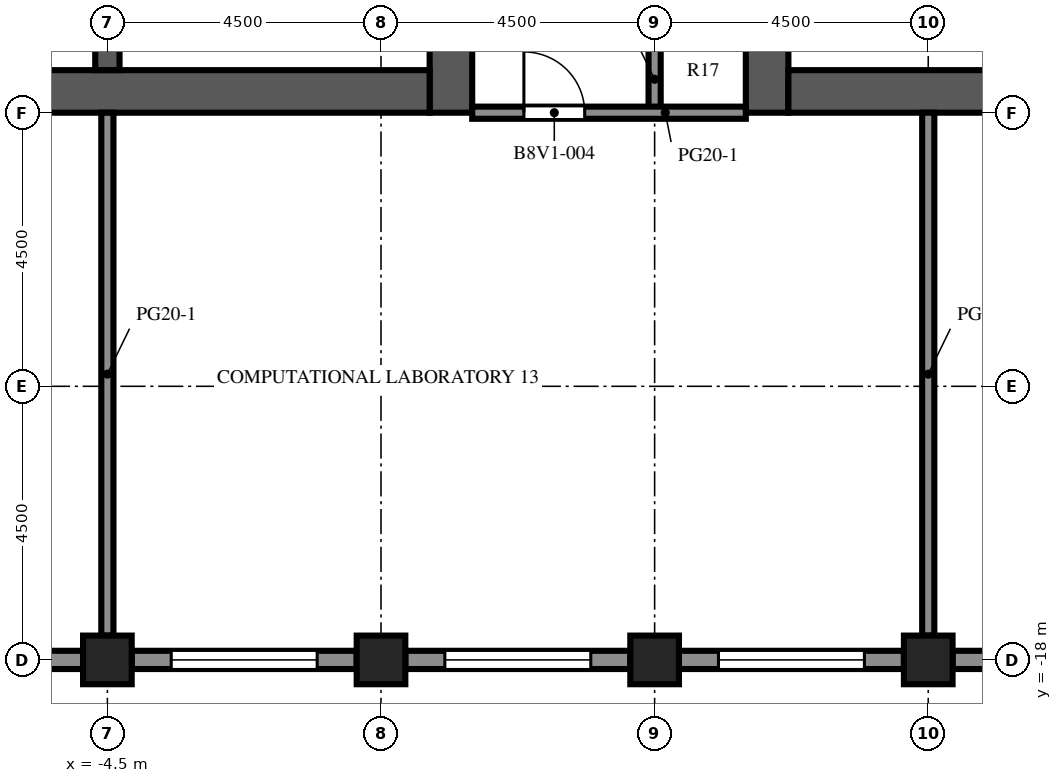
"""IFC4 building model, lengths in metres.
Left out: names, types, materials, properties, quantities, classifications, styles, units other than length and angle.
Written with IfcOpenShell. Run it as: python <this file> out.ifc"""

import sys

from ifc_helpers import new_model, si_unit, direction, frame, frame_2d, origin, origin_2d, place, context, subcontext, project, spatial, rectangle, extrude, element, fill, save


model = new_model("IFC4")
c1 = context("Model", 3, precision=1e-05, world=origin(), true_north=direction((0.0, 1.0)))
c2 = subcontext(c1, "Body", "Model", "MODEL_VIEW")
j1 = project(units=[si_unit("LENGTHUNIT", "METRE"), si_unit("PLANEANGLEUNIT", "RADIAN")], contexts=[c1])
p1 = place(None, origin())
s1 = spatial("IfcSite", under=j1, at=p1, CompositionType="ELEMENT")
p2 = place(p1, origin())
s2 = spatial("IfcBuilding", under=s1, at=p2, CompositionType="ELEMENT")
p3 = place(p2, frame((0.0, 0.0, 278.6)))
s3 = spatial("IfcBuildingStorey", under=s2, at=p3, CompositionType="ELEMENT", Elevation=278.6)
for number, where, z_axis, x_axis in (
    (1, (-4.5, -18.0, 0.0), (0.0, 0.0, 1.0), (1.0, 0.0, 0.0)),
    (2, (0.0, -18.0, 0.0), (0.0, 0.0, 1.0), (1.0, 0.0, 0.0)),
    (3, (4.5, -18.0, 0.0), (0.0, 0.0, 1.0), (1.0, 0.0, 0.0)),
    (4, (9.0, -18.0, 0.0), (0.0, 0.0, 1.0), (1.0, 0.0, 0.0)),
):
    element("IfcColumn", number, at=place(p3, frame(where, z_axis=z_axis, x_axis=x_axis)), inside=s3, PredefinedType="COLUMN", context=c2, shape_type="SweptSolid", body=[
        extrude(rectangle(XDim=0.8, YDim=0.8, at=origin_2d()), origin(), (0.0, 0.0, 1.0), 4.1),
    ])
p4 = place(p3, frame((1.15, -9.0, 0.0), z_axis=(0.0, 0.0, 1.0), x_axis=(0.0, 1.0, 0.0)))
e5 = element("IfcWall", 5, at=p4, inside=s3, PredefinedType="SHEAR", context=c2, shape_type="SweptSolid", body=[
    extrude(rectangle(XDim=27.5, YDim=0.7, at=frame_2d((13.75, 0.0))), origin(), (0.0, 0.0, 1.0), 4.1),
])
p5 = place(p4, frame((12.55, 0.0, 0.0)))
e6 = element("IfcOpeningElement", 6, at=p5, cuts=e5, PredefinedType="OPENING", context=c2, shape_type="SweptSolid", body=[
    extrude(rectangle(XDim=2.4, YDim=2.4, at=frame_2d((1.2, 1.2))), frame((0.0, 0.36, 0.0), z_axis=(0.0, -1.0, 0.0), x_axis=(1.0, 0.0, 0.0)), (0.0, 0.0, 1.0), 0.72),
])
p6 = place(p4, frame((3.9, 0.0, 0.0)))
e7 = element("IfcOpeningElement", 7, at=p6, cuts=e5, PredefinedType="OPENING", context=c2, shape_type="SweptSolid", body=[
    extrude(rectangle(XDim=1.2, YDim=2.1, at=frame_2d((0.6, 1.05))), frame((0.0, 0.36, 0.0), z_axis=(0.0, -1.0, 0.0), x_axis=(1.0, 0.0, 0.0)), (0.0, 0.0, 1.0), 0.72),
])
p7 = place(p4, frame((19.46, 0.0, 0.0)))
e8 = element("IfcOpeningElement", 8, at=p7, cuts=e5, PredefinedType="OPENING", context=c2, shape_type="SweptSolid", body=[
    extrude(rectangle(XDim=1.0, YDim=2.1, at=frame_2d((0.5, 1.05))), frame((0.0, 0.36, 0.0), z_axis=(0.0, -1.0, 0.0), x_axis=(1.0, 0.0, 0.0)), (0.0, 0.0, 1.0), 0.72),
])
p8 = place(p4, frame((21.17, 0.0, 0.0)))
e9 = element("IfcOpeningElement", 9, at=p8, cuts=e5, PredefinedType="OPENING", context=c2, shape_type="SweptSolid", body=[
    extrude(rectangle(XDim=1.0, YDim=2.1, at=frame_2d((0.5, 1.05))), frame((0.0, 0.36, 0.0), z_axis=(0.0, -1.0, 0.0), x_axis=(1.0, 0.0, 0.0)), (0.0, 0.0, 1.0), 0.72),
])
p9 = place(p4, frame((23.26, 0.0, 0.0)))
e10 = element("IfcOpeningElement", 10, at=p9, cuts=e5, PredefinedType="OPENING", context=c2, shape_type="SweptSolid", body=[
    extrude(rectangle(XDim=1.0, YDim=2.1, at=frame_2d((0.5, 1.05))), frame((0.0, 0.36, 0.0), z_axis=(0.0, -1.0, 0.0), x_axis=(1.0, 0.0, 0.0)), (0.0, 0.0, 1.0), 0.72),
])
p10 = place(p4, frame((25.35, 0.0, 0.0)))
e11 = element("IfcOpeningElement", 11, at=p10, cuts=e5, PredefinedType="OPENING", context=c2, shape_type="SweptSolid", body=[
    extrude(rectangle(XDim=1.0, YDim=2.1, at=frame_2d((0.5, 1.05))), frame((0.0, 0.36, 0.0), z_axis=(0.0, -1.0, 0.0), x_axis=(1.0, 0.0, 0.0)), (0.0, 0.0, 1.0), 0.72),
])
p11 = place(p3, frame((-9.8, -8.65, 0.0), z_axis=(0.0, 0.0, 1.0), x_axis=(1.0, 0.0, 0.0)))
e12 = element("IfcWall", 12, at=p11, inside=s3, PredefinedType="SHEAR", context=c2, shape_type="SweptSolid", body=[
    extrude(rectangle(XDim=10.6, YDim=0.7, at=frame_2d((5.3, 0.0))), origin(), (0.0, 0.0, 1.0), 4.1),
])
p12 = place(p3, frame((-4.5, -8.3, 0.0), z_axis=(0.0, 0.0, 1.0), x_axis=(0.0, 1.0, 0.0)))
e13 = element("IfcWall", 13, at=p12, inside=s3, PredefinedType="SHEAR", context=c2, shape_type="SweptSolid", body=[
    extrude(rectangle(XDim=7.6, YDim=0.4, at=frame_2d((3.8, 0.0))), origin(), (0.0, 0.0, 1.0), 4.1),
])
p13 = place(p3, frame((6.35, -9.0, 0.0), z_axis=(0.0, 0.0, 1.0), x_axis=(0.0, 1.0, 0.0)))
e14 = element("IfcWall", 14, at=p13, inside=s3, PredefinedType="SHEAR", context=c2, shape_type="SweptSolid", body=[
    extrude(rectangle(XDim=27.5, YDim=0.7, at=frame_2d((13.75, 0.0))), origin(), (0.0, 0.0, 1.0), 4.1),
])
p14 = place(p13, frame((12.55, 0.0, 0.0)))
e15 = element("IfcOpeningElement", 15, at=p14, cuts=e14, PredefinedType="OPENING", context=c2, shape_type="SweptSolid", body=[
    extrude(rectangle(XDim=2.4, YDim=2.4, at=frame_2d((1.2, 1.2))), frame((0.0, 0.36, 0.0), z_axis=(0.0, -1.0, 0.0), x_axis=(1.0, 0.0, 0.0)), (0.0, 0.0, 1.0), 0.72),
])
p15 = place(p13, frame((3.9, 0.0, 0.0)))
e16 = element("IfcOpeningElement", 16, at=p15, cuts=e14, PredefinedType="OPENING", context=c2, shape_type="SweptSolid", body=[
    extrude(rectangle(XDim=1.2, YDim=2.1, at=frame_2d((0.6, 1.05))), frame((0.0, 0.36, 0.0), z_axis=(0.0, -1.0, 0.0), x_axis=(1.0, 0.0, 0.0)), (0.0, 0.0, 1.0), 0.72),
])
p16 = place(p13, frame((19.46, 0.0, 0.0)))
e17 = element("IfcOpeningElement", 17, at=p16, cuts=e14, PredefinedType="OPENING", context=c2, shape_type="SweptSolid", body=[
    extrude(rectangle(XDim=1.0, YDim=2.1, at=frame_2d((0.5, 1.05))), frame((0.0, 0.36, 0.0), z_axis=(0.0, -1.0, 0.0), x_axis=(1.0, 0.0, 0.0)), (0.0, 0.0, 1.0), 0.72),
])
p17 = place(p13, frame((21.17, 0.0, 0.0)))
e18 = element("IfcOpeningElement", 18, at=p17, cuts=e14, PredefinedType="OPENING", context=c2, shape_type="SweptSolid", body=[
    extrude(rectangle(XDim=1.0, YDim=2.1, at=frame_2d((0.5, 1.05))), frame((0.0, 0.36, 0.0), z_axis=(0.0, -1.0, 0.0), x_axis=(1.0, 0.0, 0.0)), (0.0, 0.0, 1.0), 0.72),
])
p18 = place(p13, frame((23.26, 0.0, 0.0)))
e19 = element("IfcOpeningElement", 19, at=p18, cuts=e14, PredefinedType="OPENING", context=c2, shape_type="SweptSolid", body=[
    extrude(rectangle(XDim=1.0, YDim=2.1, at=frame_2d((0.5, 1.05))), frame((0.0, 0.36, 0.0), z_axis=(0.0, -1.0, 0.0), x_axis=(1.0, 0.0, 0.0)), (0.0, 0.0, 1.0), 0.72),
])
p19 = place(p13, frame((25.35, 0.0, 0.0)))
e20 = element("IfcOpeningElement", 20, at=p19, cuts=e14, PredefinedType="OPENING", context=c2, shape_type="SweptSolid", body=[
    extrude(rectangle(XDim=1.0, YDim=2.1, at=frame_2d((0.5, 1.05))), frame((0.0, 0.36, 0.0), z_axis=(0.0, -1.0, 0.0), x_axis=(1.0, 0.0, 0.0)), (0.0, 0.0, 1.0), 0.72),
])
p20 = place(p3, frame((6.7, -8.65, 0.0), z_axis=(0.0, 0.0, 1.0), x_axis=(1.0, 0.0, 0.0)))
e21 = element("IfcWall", 21, at=p20, inside=s3, PredefinedType="SHEAR", context=c2, shape_type="SweptSolid", body=[
    extrude(rectangle(XDim=10.6, YDim=0.7, at=frame_2d((5.3, 0.0))), origin(), (0.0, 0.0, 1.0), 4.1),
])
p21 = place(p3, frame((-4.9, -18.0, 0.0), z_axis=(0.0, 0.0, 1.0), x_axis=(-1.0, 0.0, 0.0)))
e22 = element("IfcWall", 22, at=p21, inside=s3, PredefinedType="SOLIDWALL", context=c2, shape_type="SweptSolid", body=[
    extrude(rectangle(XDim=3.7, YDim=0.3, at=frame_2d((1.85, 0.0))), origin(), (0.0, 0.0, 1.0), 2.85),
])
p22 = place(p21, frame((0.65, 0.0, 0.8)))
e23 = element("IfcOpeningElement", 23, at=p22, cuts=e22, PredefinedType="OPENING", context=c2, shape_type="SweptSolid", body=[
    extrude(rectangle(XDim=2.4, YDim=1.7, at=frame_2d((1.2, 0.85))), frame((0.0, 0.16, 0.0), z_axis=(0.0, -1.0, 0.0), x_axis=(1.0, 0.0, 0.0)), (0.0, 0.0, 1.0), 0.32),
])
p23 = place(p3, frame((-0.4, -18.0, 0.0), z_axis=(0.0, 0.0, 1.0), x_axis=(-1.0, 0.0, 0.0)))
e24 = element("IfcWall", 24, at=p23, inside=s3, PredefinedType="SOLIDWALL", context=c2, shape_type="SweptSolid", body=[
    extrude(rectangle(XDim=3.7, YDim=0.3, at=frame_2d((1.85, 0.0))), origin(), (0.0, 0.0, 1.0), 2.85),
])
p24 = place(p23, frame((0.65, 0.0, 0.8)))
e25 = element("IfcOpeningElement", 25, at=p24, cuts=e24, PredefinedType="OPENING", context=c2, shape_type="SweptSolid", body=[
    extrude(rectangle(XDim=2.4, YDim=1.7, at=frame_2d((1.2, 0.85))), frame((0.0, 0.16, 0.0), z_axis=(0.0, -1.0, 0.0), x_axis=(1.0, 0.0, 0.0)), (0.0, 0.0, 1.0), 0.32),
])
p25 = place(p3, frame((4.1, -18.0, 0.0), z_axis=(0.0, 0.0, 1.0), x_axis=(-1.0, 0.0, 0.0)))
e26 = element("IfcWall", 26, at=p25, inside=s3, PredefinedType="SOLIDWALL", context=c2, shape_type="SweptSolid", body=[
    extrude(rectangle(XDim=3.7, YDim=0.3, at=frame_2d((1.85, 0.0))), origin(), (0.0, 0.0, 1.0), 2.85),
])
p26 = place(p25, frame((0.65, 0.0, 0.8)))
e27 = element("IfcOpeningElement", 27, at=p26, cuts=e26, PredefinedType="OPENING", context=c2, shape_type="SweptSolid", body=[
    extrude(rectangle(XDim=2.4, YDim=1.7, at=frame_2d((1.2, 0.85))), frame((0.0, 0.16, 0.0), z_axis=(0.0, -1.0, 0.0), x_axis=(1.0, 0.0, 0.0)), (0.0, 0.0, 1.0), 0.32),
])
p27 = place(p3, frame((8.6, -18.0, 0.0), z_axis=(0.0, 0.0, 1.0), x_axis=(-1.0, 0.0, 0.0)))
e28 = element("IfcWall", 28, at=p27, inside=s3, PredefinedType="SOLIDWALL", context=c2, shape_type="SweptSolid", body=[
    extrude(rectangle(XDim=3.7, YDim=0.3, at=frame_2d((1.85, 0.0))), origin(), (0.0, 0.0, 1.0), 2.85),
])
p28 = place(p27, frame((0.65, 0.0, 0.8)))
e29 = element("IfcOpeningElement", 29, at=p28, cuts=e28, PredefinedType="OPENING", context=c2, shape_type="SweptSolid", body=[
    extrude(rectangle(XDim=2.4, YDim=1.7, at=frame_2d((1.2, 0.85))), frame((0.0, 0.16, 0.0), z_axis=(0.0, -1.0, 0.0), x_axis=(1.0, 0.0, 0.0)), (0.0, 0.0, 1.0), 0.32),
])
p29 = place(p3, frame((13.1, -18.0, 0.0), z_axis=(0.0, 0.0, 1.0), x_axis=(-1.0, 0.0, 0.0)))
e30 = element("IfcWall", 30, at=p29, inside=s3, PredefinedType="SOLIDWALL", context=c2, shape_type="SweptSolid", body=[
    extrude(rectangle(XDim=3.7, YDim=0.3, at=frame_2d((1.85, 0.0))), origin(), (0.0, 0.0, 1.0), 2.85),
])
p30 = place(p29, frame((1.35, 0.0, 0.0)))
e31 = element("IfcOpeningElement", 31, at=p30, cuts=e30, PredefinedType="OPENING", context=c2, shape_type="SweptSolid", body=[
    extrude(rectangle(XDim=1.0, YDim=2.2, at=frame_2d((0.5, 1.1))), frame((0.0, 0.16, 0.0), z_axis=(0.0, -1.0, 0.0), x_axis=(1.0, 0.0, 0.0)), (0.0, 0.0, 1.0), 0.32),
])
p31 = place(p3, frame((-4.5, -17.6, 0.0), z_axis=(0.0, 0.0, 1.0), x_axis=(0.0, 1.0, 0.0)))
e32 = element("IfcWall", 32, at=p31, inside=s3, PredefinedType="PARTITIONING", context=c2, shape_type="SweptSolid", body=[
    extrude(rectangle(XDim=8.6, YDim=0.2, at=frame_2d((4.3, 0.0))), origin(), (0.0, 0.0, 1.0), 3.65),
])
p32 = place(p3, frame((4.5, -6.0, 0.0), z_axis=(0.0, 0.0, 1.0), x_axis=(0.0, -1.0, 0.0)))
e33 = element("IfcWall", 33, at=p32, inside=s3, PredefinedType="PARTITIONING", context=c2, shape_type="SweptSolid", body=[
    extrude(rectangle(XDim=3.0, YDim=0.2, at=frame_2d((1.5, 0.0))), origin(), (0.0, 0.0, 1.0), 3.65),
])
p33 = place(p32, frame((0.9, 0.0, 0.0)))
e34 = element("IfcOpeningElement", 34, at=p33, cuts=e33, PredefinedType="OPENING", context=c2, shape_type="SweptSolid", body=[
    extrude(rectangle(XDim=1.0, YDim=2.1, at=frame_2d((0.5, 1.05))), frame((0.0, 0.11, 0.0), z_axis=(0.0, -1.0, 0.0), x_axis=(1.0, 0.0, 0.0)), (0.0, 0.0, 1.0), 0.22),
])
p34 = place(p3, frame((9.0, -17.6, 0.0), z_axis=(0.0, 0.0, 1.0), x_axis=(0.0, 1.0, 0.0)))
e35 = element("IfcWall", 35, at=p34, inside=s3, PredefinedType="PARTITIONING", context=c2, shape_type="SweptSolid", body=[
    extrude(rectangle(XDim=8.6, YDim=0.2, at=frame_2d((4.3, 0.0))), origin(), (0.0, 0.0, 1.0), 3.65),
])
p35 = place(p3, frame((6.0, -9.0, 0.0), z_axis=(0.0, 0.0, 1.0), x_axis=(-1.0, 0.0, 0.0)))
e36 = element("IfcWall", 36, at=p35, inside=s3, PredefinedType="PARTITIONING", context=c2, shape_type="SweptSolid", body=[
    extrude(rectangle(XDim=4.5, YDim=0.2, at=frame_2d((2.25, 0.0))), origin(), (0.0, 0.0, 1.0), 3.65),
])
p36 = place(p35, frame((2.65, 0.0, 0.0)))
e37 = element("IfcOpeningElement", 37, at=p36, cuts=e36, PredefinedType="OPENING", context=c2, shape_type="SweptSolid", body=[
    extrude(rectangle(XDim=1.0, YDim=2.1, at=frame_2d((0.5, 1.05))), frame((0.0, 0.11, 0.0), z_axis=(0.0, -1.0, 0.0), x_axis=(1.0, 0.0, 0.0)), (0.0, 0.0, 1.0), 0.22),
])
p37 = place(p24, origin())
e38 = element("IfcWindow", 38, at=p37, inside=s3, PartitioningType="SINGLE_PANEL", PredefinedType="WINDOW", context=c2, shape_type="SweptSolid", body=[
    extrude(rectangle(XDim=2.4, YDim=1.7, at=frame_2d((1.2, 0.85))), frame((0.0, 0.03, 0.0), z_axis=(0.0, -1.0, 0.0), x_axis=(1.0, 0.0, 0.0)), (0.0, 0.0, 1.0), 0.06),
])
fill(e25, e38)
p38 = place(p26, origin())
e39 = element("IfcWindow", 39, at=p38, inside=s3, PartitioningType="SINGLE_PANEL", PredefinedType="WINDOW", context=c2, shape_type="SweptSolid", body=[
    extrude(rectangle(XDim=2.4, YDim=1.7, at=frame_2d((1.2, 0.85))), frame((0.0, 0.03, 0.0), z_axis=(0.0, -1.0, 0.0), x_axis=(1.0, 0.0, 0.0)), (0.0, 0.0, 1.0), 0.06),
])
fill(e27, e39)
p39 = place(p28, origin())
e40 = element("IfcWindow", 40, at=p39, inside=s3, PartitioningType="SINGLE_PANEL", PredefinedType="WINDOW", context=c2, shape_type="SweptSolid", body=[
    extrude(rectangle(XDim=2.4, YDim=1.7, at=frame_2d((1.2, 0.85))), frame((0.0, 0.03, 0.0), z_axis=(0.0, -1.0, 0.0), x_axis=(1.0, 0.0, 0.0)), (0.0, 0.0, 1.0), 0.06),
])
fill(e29, e40)
p40 = place(p36, origin())
e41 = element("IfcDoor", 41, at=p40, inside=s3, OperationType="SINGLE_SWING_RIGHT", PredefinedType="DOOR", context=c2, shape_type="SweptSolid", body=[
    extrude(rectangle(XDim=1.0, YDim=2.1, at=frame_2d((0.5, 1.05))), frame((0.0, 0.025, 0.0), z_axis=(0.0, -1.0, 0.0), x_axis=(1.0, 0.0, 0.0)), (0.0, 0.0, 1.0), 0.05),
])
fill(e37, e41)
save(model, sys.argv[1])
